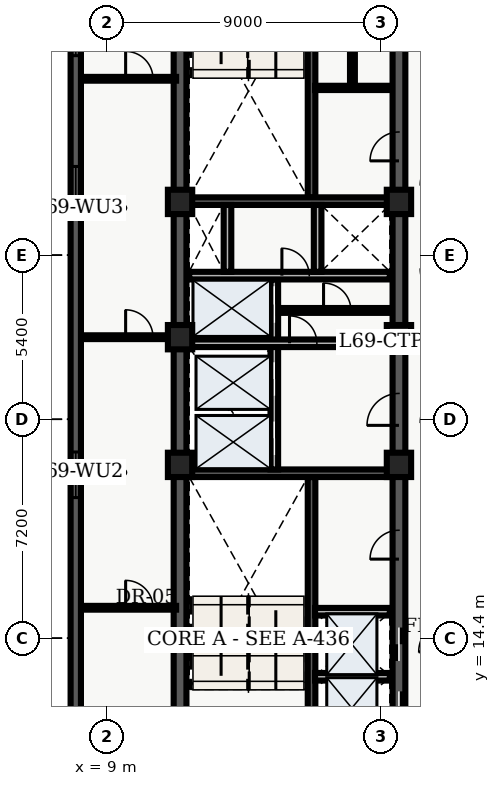
"""IFC4 building model, lengths in metres.
Left out: names, types, materials, properties, quantities, classifications, styles, units other than length and angle.
Written with IfcOpenShell. Run it as: python <this file> out.ifc"""

import sys

from ifc_helpers import new_model, entity, si_unit, converted_unit, direction, frame, origin_with_axes, origin_2d_with_axis, place, context, subcontext, project, spatial, polyline, rectangle, outline, extrude, element, fill, save


model = new_model("IFC4")
c1 = context("Model", 3, precision=1e-05, world=origin_with_axes(), true_north=direction((0.0, 1.0)))
c2 = subcontext(c1, "Body", "Model", "MODEL_VIEW")
j1 = project(units=[si_unit("LENGTHUNIT", "METRE"), converted_unit("PLANEANGLEUNIT", "DEGREE", entity("IfcPlaneAngleMeasure", 0.017), si_unit("PLANEANGLEUNIT", "RADIAN"), dimensions=[0, 0, 0, 0, 0, 0, 0])], contexts=[c1])
p1 = place(None, origin_with_axes())
s1 = spatial("IfcSite", under=j1, at=p1, CompositionType="ELEMENT")
p2 = place(p1, origin_with_axes())
s2 = spatial("IfcBuilding", under=s1, at=p2, CompositionType="ELEMENT")
p3 = place(p2, frame((0.0, 0.0, 280.2), z_axis=(0.0, 0.0, 1.0), x_axis=(1.0, 0.0, 0.0)))
s3 = spatial("IfcBuildingStorey", under=s2, at=p3, CompositionType="ELEMENT", Elevation=280.2)
p4 = place(p3, frame((11.4, 10.8, 0.0), z_axis=(0.0, 0.0, 1.0), x_axis=(0.0, 1.0, 0.0)))
e1 = element("IfcWall", 1, at=p4, inside=s3, PredefinedType="SHEAR", context=c2, shape_type="SweptSolid", body=[
    extrude(outline(polyline([(0.0, -0.21), (27.0, -0.21), (27.0, 0.21), (0.0, 0.21), (0.0, -0.21)])), origin_with_axes(), (0.0, 0.0, 1.0), 3.66),
])
p5 = place(p3, frame((18.6, 10.8, 0.0), z_axis=(0.0, 0.0, 1.0), x_axis=(0.0, 1.0, 0.0)))
e2 = element("IfcWall", 2, at=p5, inside=s3, PredefinedType="SHEAR", context=c2, shape_type="SweptSolid", body=[
    extrude(outline(polyline([(0.0, -0.21), (13.5, -0.21), (13.5, 0.21), (0.0, 0.21), (0.0, -0.21)])), origin_with_axes(), (0.0, 0.0, 1.0), 3.66),
])
p6 = place(p5, frame((1.3, 0.0, 0.0), z_axis=(0.0, 0.0, 1.0), x_axis=(1.0, 0.0, 0.0)))
e3 = element("IfcOpeningElement", 3, at=p6, cuts=e2, PredefinedType="OPENING", context=c2, shape_type="SweptSolid", body=[
    extrude(rectangle(XDim=1.1, YDim=0.44, at=origin_2d_with_axis()), origin_with_axes(), (0.0, 0.0, 1.0), 2.15),
])
p7 = place(p5, frame((3.4, 0.0, 0.0), z_axis=(0.0, 0.0, 1.0), x_axis=(1.0, 0.0, 0.0)))
e4 = element("IfcOpeningElement", 4, at=p7, cuts=e2, PredefinedType="OPENING", context=c2, shape_type="SweptSolid", body=[
    extrude(rectangle(XDim=1.1, YDim=0.44, at=origin_2d_with_axis()), origin_with_axes(), (0.0, 0.0, 1.0), 2.15),
])
p8 = place(p5, frame((11.125, 0.0, 0.0), z_axis=(0.0, 0.0, 1.0), x_axis=(1.0, 0.0, 0.0)))
e5 = element("IfcOpeningElement", 5, at=p8, cuts=e2, PredefinedType="OPENING", context=c2, shape_type="SweptSolid", body=[
    extrude(rectangle(XDim=1.05, YDim=0.44, at=origin_2d_with_axis()), origin_with_axes(), (0.0, 0.0, 1.0), 2.15),
])
p9 = place(p5, frame((6.675, 0.0, 0.0), z_axis=(0.0, 0.0, 1.0), x_axis=(1.0, 0.0, 0.0)))
e6 = element("IfcOpeningElement", 6, at=p9, cuts=e2, PredefinedType="OPENING", context=c2, shape_type="SweptSolid", body=[
    extrude(rectangle(XDim=0.95, YDim=0.44, at=origin_2d_with_axis()), origin_with_axes(), (0.0, 0.0, 1.0), 2.15),
])
p10 = place(p3, frame((18.6, 24.3, 0.0), z_axis=(0.0, 0.0, 1.0), x_axis=(0.0, 1.0, 0.0)))
e7 = element("IfcWall", 7, at=p10, inside=s3, PredefinedType="SHEAR", context=c2, shape_type="SweptSolid", body=[
    extrude(outline(polyline([(0.0, -0.21), (13.5, -0.21), (13.5, 0.21), (0.0, 0.21), (0.0, -0.21)])), origin_with_axes(), (0.0, 0.0, 1.0), 3.66),
])
p11 = place(p10, frame((6.275, 0.0, 0.0), z_axis=(0.0, 0.0, 1.0), x_axis=(1.0, 0.0, 0.0)))
e8 = element("IfcOpeningElement", 8, at=p11, cuts=e7, PredefinedType="OPENING", context=c2, shape_type="SweptSolid", body=[
    extrude(rectangle(XDim=0.95, YDim=0.44, at=origin_2d_with_axis()), origin_with_axes(), (0.0, 0.0, 1.0), 2.15),
])
p12 = place(p10, frame((10.875, 0.0, 0.0), z_axis=(0.0, 0.0, 1.0), x_axis=(1.0, 0.0, 0.0)))
e9 = element("IfcOpeningElement", 9, at=p12, cuts=e7, PredefinedType="OPENING", context=c2, shape_type="SweptSolid", body=[
    extrude(rectangle(XDim=0.95, YDim=0.44, at=origin_2d_with_axis()), origin_with_axes(), (0.0, 0.0, 1.0), 2.15),
])
p13 = place(p3, frame((15.725, 11.01, 0.0), z_axis=(0.0, 0.0, 1.0), x_axis=(0.0, 1.0, 0.0)))
e10 = element("IfcWall", 10, at=p13, inside=s3, PredefinedType="SHEAR", context=c2, shape_type="SweptSolid", body=[
    extrude(outline(polyline([(0.0, -0.125), (8.69, -0.125), (8.69, 0.125), (0.0, 0.125), (0.0, -0.125)])), origin_with_axes(), (0.0, 0.0, 1.0), 3.66),
])
p14 = place(p3, frame((11.61, 19.825, 0.0), z_axis=(0.0, 0.0, 1.0), x_axis=(1.0, 0.0, 0.0)))
e11 = element("IfcWall", 11, at=p14, inside=s3, PredefinedType="SHEAR", context=c2, shape_type="SweptSolid", body=[
    extrude(outline(polyline([(0.0, -0.125), (6.78, -0.125), (6.78, 0.125), (0.0, 0.125), (0.0, -0.125)])), origin_with_axes(), (0.0, 0.0, 1.0), 3.66),
])
p15 = place(p3, frame((15.725, 28.9, 0.0), z_axis=(0.0, 0.0, 1.0), x_axis=(0.0, 1.0, 0.0)))
e12 = element("IfcWall", 12, at=p15, inside=s3, PredefinedType="SHEAR", context=c2, shape_type="SweptSolid", body=[
    extrude(outline(polyline([(0.0, -0.125), (8.69, -0.125), (8.69, 0.125), (0.0, 0.125), (0.0, -0.125)])), origin_with_axes(), (0.0, 0.0, 1.0), 3.66),
])
p16 = place(p3, frame((11.61, 28.775, 0.0), z_axis=(0.0, 0.0, 1.0), x_axis=(1.0, 0.0, 0.0)))
e13 = element("IfcWall", 13, at=p16, inside=s3, PredefinedType="SHEAR", context=c2, shape_type="SweptSolid", body=[
    extrude(outline(polyline([(0.0, -0.125), (6.78, -0.125), (6.78, 0.125), (0.0, 0.125), (0.0, -0.125)])), origin_with_axes(), (0.0, 0.0, 1.0), 3.66),
])
p17 = place(p3, frame((14.5, 19.95, 0.0), z_axis=(0.0, 0.0, 1.0), x_axis=(0.0, 1.0, 0.0)))
e14 = element("IfcWall", 14, at=p17, inside=s3, PredefinedType="SOLIDWALL", context=c2, shape_type="SweptSolid", body=[
    extrude(outline(polyline([(0.0, -0.125), (6.25, -0.125), (6.25, 0.125), (0.0, 0.125), (0.0, -0.125)])), origin_with_axes(), (0.0, 0.0, 1.0), 2.7),
])
p18 = place(p17, frame((1.025, 0.0, 0.0), z_axis=(0.0, 0.0, 1.0), x_axis=(1.0, 0.0, 0.0)))
e15 = element("IfcOpeningElement", 15, at=p18, cuts=e14, PredefinedType="OPENING", context=c2, shape_type="SweptSolid", body=[
    extrude(rectangle(XDim=1.1, YDim=0.27, at=origin_2d_with_axis()), origin_with_axes(), (0.0, 0.0, 1.0), 2.15),
])
p19 = place(p17, frame((2.975, 0.0, 0.0), z_axis=(0.0, 0.0, 1.0), x_axis=(1.0, 0.0, 0.0)))
e16 = element("IfcOpeningElement", 16, at=p19, cuts=e14, PredefinedType="OPENING", context=c2, shape_type="SweptSolid", body=[
    extrude(rectangle(XDim=1.1, YDim=0.27, at=origin_2d_with_axis()), origin_with_axes(), (0.0, 0.0, 1.0), 2.15),
])
p20 = place(p17, frame((5.425, 0.0, 0.0), z_axis=(0.0, 0.0, 1.0), x_axis=(1.0, 0.0, 0.0)))
e17 = element("IfcOpeningElement", 17, at=p20, cuts=e14, PredefinedType="OPENING", context=c2, shape_type="SweptSolid", body=[
    extrude(rectangle(XDim=1.2, YDim=0.27, at=origin_2d_with_axis()), origin_with_axes(), (0.0, 0.0, 1.0), 2.15),
])
p21 = place(p3, frame((11.7, 24.1, 0.0), z_axis=(0.0, 0.0, 1.0), x_axis=(1.0, 0.0, 0.0)))
e18 = element("IfcWall", 18, at=p21, inside=s3, PredefinedType="SOLIDWALL", context=c2, shape_type="SweptSolid", body=[
    extrude(outline(polyline([(0.0, -0.125), (6.6, -0.125), (6.6, 0.125), (0.0, 0.125), (0.0, -0.125)])), origin_with_axes(), (0.0, 0.0, 1.0), 2.7),
])
p22 = place(p21, frame((3.75, 0.0, 0.0), z_axis=(0.0, 0.0, 1.0), x_axis=(1.0, 0.0, 0.0)))
e19 = element("IfcOpeningElement", 19, at=p22, cuts=e18, PredefinedType="OPENING", context=c2, shape_type="SweptSolid", body=[
    extrude(rectangle(XDim=0.9, YDim=0.27, at=origin_2d_with_axis()), origin_with_axes(), (0.0, 0.0, 1.0), 2.15),
])
p23 = place(p3, frame((11.7, 26.325, 0.0), z_axis=(0.0, 0.0, 1.0), x_axis=(1.0, 0.0, 0.0)))
e20 = element("IfcWall", 20, at=p23, inside=s3, PredefinedType="SOLIDWALL", context=c2, shape_type="SweptSolid", body=[
    extrude(outline(polyline([(0.0, -0.125), (6.6, -0.125), (6.6, 0.125), (0.0, 0.125), (0.0, -0.125)])), origin_with_axes(), (0.0, 0.0, 1.0), 2.7),
])
p24 = place(p23, frame((3.5, 0.0, 0.0), z_axis=(0.0, 0.0, 1.0), x_axis=(1.0, 0.0, 0.0)))
e21 = element("IfcOpeningElement", 21, at=p24, cuts=e20, PredefinedType="OPENING", context=c2, shape_type="SweptSolid", body=[
    extrude(rectangle(XDim=0.9, YDim=0.27, at=origin_2d_with_axis()), origin_with_axes(), (0.0, 0.0, 1.0), 2.15),
])
for number, where, z_axis, x_axis in (
    (22, (12.96, 26.45, 0.0), (0.0, 0.0, 1.0), (0.0, 1.0, 0.0)),
    (23, (15.925, 26.45, 0.0), (0.0, 0.0, 1.0), (0.0, 1.0, 0.0)),
):
    element("IfcWall", number, at=place(p3, frame(where, z_axis=z_axis, x_axis=x_axis)), inside=s3, PredefinedType="SOLIDWALL", context=c2, shape_type="SweptSolid", body=[
        extrude(outline(polyline([(0.0, -0.125), (2.2, -0.125), (2.2, 0.125), (0.0, 0.125), (0.0, -0.125)])), origin_with_axes(), (0.0, 0.0, 1.0), 2.7),
    ])
for number, where, z_axis, x_axis in (
    (24, (11.4, 20.1, 0.0), (0.0, 0.0, 1.0), (1.0, 0.0, 0.0)),
    (25, (11.4, 24.3, 0.0), (0.0, 0.0, 1.0), (1.0, 0.0, 0.0)),
    (26, (11.4, 28.75, 0.0), (0.0, 0.0, 1.0), (1.0, 0.0, 0.0)),
    (27, (18.6, 20.1, 0.0), (0.0, 0.0, 1.0), (1.0, 0.0, 0.0)),
    (28, (18.6, 24.3, 0.0), (0.0, 0.0, 1.0), (1.0, 0.0, 0.0)),
    (29, (18.6, 28.75, 0.0), (0.0, 0.0, 1.0), (1.0, 0.0, 0.0)),
):
    element("IfcColumn", number, at=place(p3, frame(where, z_axis=z_axis, x_axis=x_axis)), inside=s3, PredefinedType="COLUMN", context=c2, shape_type="SweptSolid", body=[
        extrude(rectangle(XDim=0.8, YDim=0.8, at=origin_2d_with_axis()), origin_with_axes(), (0.0, 0.0, 1.0), 3.9),
    ])
p25 = place(p3, frame((14.62, 25.18, 0.0), z_axis=(0.0, 0.0, 1.0), x_axis=(1.0, 0.0, 0.0)))
e30 = element("IfcWall", 30, at=p25, inside=s3, PredefinedType="PARTITIONING", context=c2, shape_type="SweptSolid", body=[
    extrude(outline(polyline([(0.0, -0.08), (3.68, -0.08), (3.68, 0.08), (0.0, 0.08), (0.0, -0.08)])), origin_with_axes(), (0.0, 0.0, 1.0), 2.7),
])
p26 = place(p25, frame((1.95, 0.0, 0.0), z_axis=(0.0, 0.0, 1.0), x_axis=(1.0, 0.0, 0.0)))
e31 = element("IfcOpeningElement", 31, at=p26, cuts=e30, PredefinedType="OPENING", context=c2, shape_type="SweptSolid", body=[
    extrude(rectangle(XDim=0.9, YDim=0.18, at=origin_2d_with_axis()), origin_with_axes(), (0.0, 0.0, 1.0), 2.15),
])
for number, where, z_axis, x_axis in (
    (32, (15.84, 13.13, 0.0), (0.0, 0.0, 1.0), (1.0, 0.0, 0.0)),
    (33, (15.84, 15.27, 0.0), (0.0, 0.0, 1.0), (1.0, 0.0, 0.0)),
):
    element("IfcWall", number, at=place(p3, frame(where, z_axis=z_axis, x_axis=x_axis)), inside=s3, PredefinedType="SOLIDWALL", context=c2, shape_type="SweptSolid", body=[
        extrude(outline(polyline([(0.0, -0.125), (2.46, -0.125), (2.46, 0.125), (0.0, 0.125), (0.0, -0.125)])), origin_with_axes(), (0.0, 0.0, 1.0), 2.7),
    ])
p27 = place(p3, frame((15.84, 32.5, 0.0), z_axis=(0.0, 0.0, 1.0), x_axis=(1.0, 0.0, 0.0)))
e34 = element("IfcWall", 34, at=p27, inside=s3, PredefinedType="PARTITIONING", context=c2, shape_type="SweptSolid", body=[
    extrude(outline(polyline([(0.0, -0.07), (2.46, -0.07), (2.46, 0.07), (0.0, 0.07), (0.0, -0.07)])), origin_with_axes(), (0.0, 0.0, 1.0), 2.7),
])
p28 = place(p3, frame((17.07, 32.58, 0.0), z_axis=(0.0, 0.0, 1.0), x_axis=(0.0, 1.0, 0.0)))
e35 = element("IfcWall", 35, at=p28, inside=s3, PredefinedType="PARTITIONING", context=c2, shape_type="SweptSolid", body=[
    extrude(outline(polyline([(0.0, -0.08), (4.92, -0.08), (4.92, 0.08), (0.0, 0.08), (0.0, -0.08)])), origin_with_axes(), (0.0, 0.0, 1.0), 2.7),
])
p29 = place(p28, frame((2.45, 0.0, 0.0), z_axis=(0.0, 0.0, 1.0), x_axis=(1.0, 0.0, 0.0)))
e36 = element("IfcOpeningElement", 36, at=p29, cuts=e35, PredefinedType="OPENING", context=c2, shape_type="SweptSolid", body=[
    extrude(rectangle(XDim=0.9, YDim=0.18, at=origin_2d_with_axis()), origin_with_axes(), (0.0, 0.0, 1.0), 2.15),
])
p30 = place(p3, frame((8.135, 15.4, 0.0), z_axis=(0.0, 0.0, 1.0), x_axis=(1.0, 0.0, 0.0)))
e37 = element("IfcWall", 37, at=p30, inside=s3, PredefinedType="PARTITIONING", context=c2, shape_type="SweptSolid", body=[
    extrude(outline(polyline([(0.0, -0.062), (3.135, -0.062), (3.135, 0.062), (0.0, 0.062), (0.0, -0.062)])), origin_with_axes(), (0.0, 0.0, 1.0), 2.7),
])
p31 = place(p30, frame((1.925, 0.0, 0.0), z_axis=(0.0, 0.0, 1.0), x_axis=(1.0, 0.0, 0.0)))
e38 = element("IfcOpeningElement", 38, at=p31, cuts=e37, PredefinedType="OPENING", context=c2, shape_type="SweptSolid", body=[
    extrude(rectangle(XDim=0.9, YDim=0.145, at=origin_2d_with_axis()), origin_with_axes(), (0.0, 0.0, 1.0), 2.15),
])
p32 = place(p3, frame((8.135, 24.3, 0.0), z_axis=(0.0, 0.0, 1.0), x_axis=(1.0, 0.0, 0.0)))
e39 = element("IfcWall", 39, at=p32, inside=s3, PredefinedType="PARTITIONING", context=c2, shape_type="SweptSolid", body=[
    extrude(outline(polyline([(0.0, -0.062), (3.135, -0.062), (3.135, 0.062), (0.0, 0.062), (0.0, -0.062)])), origin_with_axes(), (0.0, 0.0, 1.0), 2.7),
])
p33 = place(p32, frame((1.925, 0.0, 0.0), z_axis=(0.0, 0.0, 1.0), x_axis=(1.0, 0.0, 0.0)))
e40 = element("IfcOpeningElement", 40, at=p33, cuts=e39, PredefinedType="OPENING", context=c2, shape_type="SweptSolid", body=[
    extrude(rectangle(XDim=0.9, YDim=0.145, at=origin_2d_with_axis()), origin_with_axes(), (0.0, 0.0, 1.0), 2.15),
])
p34 = place(p3, frame((8.135, 32.8, 0.0), z_axis=(0.0, 0.0, 1.0), x_axis=(1.0, 0.0, 0.0)))
e41 = element("IfcWall", 41, at=p34, inside=s3, PredefinedType="PARTITIONING", context=c2, shape_type="SweptSolid", body=[
    extrude(outline(polyline([(0.0, -0.062), (3.135, -0.062), (3.135, 0.062), (0.0, 0.062), (0.0, -0.062)])), origin_with_axes(), (0.0, 0.0, 1.0), 2.7),
])
p35 = place(p34, frame((1.925, 0.0, 0.0), z_axis=(0.0, 0.0, 1.0), x_axis=(1.0, 0.0, 0.0)))
e42 = element("IfcOpeningElement", 42, at=p35, cuts=e41, PredefinedType="OPENING", context=c2, shape_type="SweptSolid", body=[
    extrude(rectangle(XDim=0.9, YDim=0.145, at=origin_2d_with_axis()), origin_with_axes(), (0.0, 0.0, 1.0), 2.15),
])
p36 = place(p3, frame((7.97, 2.74, 0.0), z_axis=(0.0, 0.0, 1.0), x_axis=(0.0, 1.0, 0.0)))
e43 = element("IfcWall", 43, at=p36, inside=s3, PredefinedType="SOLIDWALL", context=c2, shape_type="SweptSolid", body=[
    extrude(outline(polyline([(0.0, -0.17), (43.46, -0.17), (43.46, 0.17), (0.0, 0.17), (0.0, -0.17)])), origin_with_axes(), (0.0, 0.0, 1.0), 3.66),
])
p37 = place(p36, frame((2.948, 0.0, 0.45), z_axis=(0.0, 0.0, 1.0), x_axis=(1.0, 0.0, 0.0)))
e44 = element("IfcOpeningElement", 44, at=p37, cuts=e43, PredefinedType="OPENING", context=c2, shape_type="SweptSolid", body=[
    extrude(rectangle(XDim=1.5, YDim=0.36, at=origin_2d_with_axis()), origin_with_axes(), (0.0, 0.0, 1.0), 2.1),
])
p38 = place(p36, frame((7.643, 0.0, 0.45), z_axis=(0.0, 0.0, 1.0), x_axis=(1.0, 0.0, 0.0)))
e45 = element("IfcOpeningElement", 45, at=p38, cuts=e43, PredefinedType="OPENING", context=c2, shape_type="SweptSolid", body=[
    extrude(rectangle(XDim=1.5, YDim=0.36, at=origin_2d_with_axis()), origin_with_axes(), (0.0, 0.0, 1.0), 2.1),
])
p39 = place(p36, frame((17.034, 0.0, 0.45), z_axis=(0.0, 0.0, 1.0), x_axis=(1.0, 0.0, 0.0)))
e46 = element("IfcOpeningElement", 46, at=p39, cuts=e43, PredefinedType="OPENING", context=c2, shape_type="SweptSolid", body=[
    extrude(rectangle(XDim=1.5, YDim=0.36, at=origin_2d_with_axis()), origin_with_axes(), (0.0, 0.0, 1.0), 2.1),
])
p40 = place(p36, frame((26.426, 0.0, 0.45), z_axis=(0.0, 0.0, 1.0), x_axis=(1.0, 0.0, 0.0)))
e47 = element("IfcOpeningElement", 47, at=p40, cuts=e43, PredefinedType="OPENING", context=c2, shape_type="SweptSolid", body=[
    extrude(rectangle(XDim=1.5, YDim=0.36, at=origin_2d_with_axis()), origin_with_axes(), (0.0, 0.0, 1.0), 2.1),
])
p41 = place(p36, frame((31.571, 0.0, 0.45), z_axis=(0.0, 0.0, 1.0), x_axis=(1.0, 0.0, 0.0)))
e48 = element("IfcOpeningElement", 48, at=p41, cuts=e43, PredefinedType="OPENING", context=c2, shape_type="SweptSolid", body=[
    extrude(rectangle(XDim=1.5, YDim=0.36, at=origin_2d_with_axis()), origin_with_axes(), (0.0, 0.0, 1.0), 2.1),
])
p42 = place(p36, frame((35.817, 0.0, 0.45), z_axis=(0.0, 0.0, 1.0), x_axis=(1.0, 0.0, 0.0)))
e49 = element("IfcOpeningElement", 49, at=p42, cuts=e43, PredefinedType="OPENING", context=c2, shape_type="SweptSolid", body=[
    extrude(rectangle(XDim=1.5, YDim=0.36, at=origin_2d_with_axis()), origin_with_axes(), (0.0, 0.0, 1.0), 2.1),
])
p43 = place(p36, frame((40.512, 0.0, 0.45), z_axis=(0.0, 0.0, 1.0), x_axis=(1.0, 0.0, 0.0)))
e50 = element("IfcOpeningElement", 50, at=p43, cuts=e43, PredefinedType="OPENING", context=c2, shape_type="SweptSolid", body=[
    extrude(rectangle(XDim=1.5, YDim=0.36, at=origin_2d_with_axis()), origin_with_axes(), (0.0, 0.0, 1.0), 2.1),
])
p44 = place(p5, frame((1.3, 0.0, 0.0), z_axis=(0.0, 0.0, 1.0), x_axis=(1.0, 0.0, 0.0)))
e51 = element("IfcDoor", 51, at=p44, inside=s3, OperationType="SLIDING_TO_LEFT", PredefinedType="DOOR", context=c2, shape_type="SweptSolid", body=[
    extrude(rectangle(XDim=1.1, YDim=0.09, at=origin_2d_with_axis()), origin_with_axes(), (0.0, 0.0, 1.0), 2.15),
])
fill(e3, e51)
p45 = place(p5, frame((3.4, 0.0, 0.0), z_axis=(0.0, 0.0, 1.0), x_axis=(1.0, 0.0, 0.0)))
e52 = element("IfcDoor", 52, at=p45, inside=s3, OperationType="SLIDING_TO_RIGHT", PredefinedType="DOOR", context=c2, shape_type="SweptSolid", body=[
    extrude(rectangle(XDim=1.1, YDim=0.09, at=origin_2d_with_axis()), origin_with_axes(), (0.0, 0.0, 1.0), 2.15),
])
fill(e4, e52)
p46 = place(p17, frame((1.025, 0.0, 0.0), z_axis=(0.0, 0.0, 1.0), x_axis=(1.0, 0.0, 0.0)))
e53 = element("IfcDoor", 53, at=p46, inside=s3, OperationType="SLIDING_TO_LEFT", PredefinedType="DOOR", context=c2, shape_type="SweptSolid", body=[
    extrude(rectangle(XDim=1.1, YDim=0.09, at=origin_2d_with_axis()), origin_with_axes(), (0.0, 0.0, 1.0), 2.15),
])
fill(e15, e53)
p47 = place(p17, frame((2.975, 0.0, 0.0), z_axis=(0.0, 0.0, 1.0), x_axis=(1.0, 0.0, 0.0)))
e54 = element("IfcDoor", 54, at=p47, inside=s3, OperationType="SLIDING_TO_RIGHT", PredefinedType="DOOR", context=c2, shape_type="SweptSolid", body=[
    extrude(rectangle(XDim=1.1, YDim=0.09, at=origin_2d_with_axis()), origin_with_axes(), (0.0, 0.0, 1.0), 2.15),
])
fill(e16, e54)
p48 = place(p17, frame((5.425, 0.0, 0.0), z_axis=(0.0, 0.0, 1.0), x_axis=(1.0, 0.0, 0.0)))
e55 = element("IfcDoor", 55, at=p48, inside=s3, OperationType="DOUBLE_DOOR_SLIDING", PredefinedType="DOOR", context=c2, shape_type="SweptSolid", body=[
    extrude(rectangle(XDim=1.2, YDim=0.09, at=origin_2d_with_axis()), origin_with_axes(), (0.0, 0.0, 1.0), 2.15),
])
fill(e17, e55)
p49 = place(p5, frame((11.125, 0.0, 0.0), z_axis=(0.0, 0.0, 1.0), x_axis=(1.0, 0.0, 0.0)))
e56 = element("IfcDoor", 56, at=p49, inside=s3, OperationType="SINGLE_SWING_LEFT", PredefinedType="DOOR", context=c2, shape_type="SweptSolid", body=[
    extrude(rectangle(XDim=1.05, YDim=0.09, at=origin_2d_with_axis()), origin_with_axes(), (0.0, 0.0, 1.0), 2.15),
])
fill(e5, e56)
p50 = place(p23, frame((3.5, 0.0, 0.0), z_axis=(0.0, 0.0, 1.0), x_axis=(1.0, 0.0, 0.0)))
e57 = element("IfcDoor", 57, at=p50, inside=s3, OperationType="SINGLE_SWING_LEFT", PredefinedType="DOOR", context=c2, shape_type="SweptSolid", body=[
    extrude(rectangle(XDim=0.9, YDim=0.09, at=origin_2d_with_axis()), origin_with_axes(), (0.0, 0.0, 1.0), 2.15),
])
fill(e21, e57)
p51 = place(p21, frame((3.75, 0.0, 0.0), z_axis=(0.0, 0.0, 1.0), x_axis=(1.0, 0.0, 0.0)))
e58 = element("IfcDoor", 58, at=p51, inside=s3, OperationType="SINGLE_SWING_LEFT", PredefinedType="DOOR", context=c2, shape_type="SweptSolid", body=[
    extrude(rectangle(XDim=0.9, YDim=0.09, at=origin_2d_with_axis()), origin_with_axes(), (0.0, 0.0, 1.0), 2.15),
])
fill(e19, e58)
p52 = place(p25, frame((1.95, 0.0, 0.0), z_axis=(0.0, 0.0, 1.0), x_axis=(1.0, 0.0, 0.0)))
e59 = element("IfcDoor", 59, at=p52, inside=s3, OperationType="SINGLE_SWING_LEFT", PredefinedType="DOOR", context=c2, shape_type="SweptSolid", body=[
    extrude(rectangle(XDim=0.9, YDim=0.09, at=origin_2d_with_axis()), origin_with_axes(), (0.0, 0.0, 1.0), 2.15),
])
fill(e31, e59)
p53 = place(p5, frame((6.675, 0.0, 0.0), z_axis=(0.0, 0.0, 1.0), x_axis=(1.0, 0.0, 0.0)))
e60 = element("IfcDoor", 60, at=p53, inside=s3, OperationType="SINGLE_SWING_LEFT", PredefinedType="DOOR", context=c2, shape_type="SweptSolid", body=[
    extrude(rectangle(XDim=0.95, YDim=0.09, at=origin_2d_with_axis()), origin_with_axes(), (0.0, 0.0, 1.0), 2.15),
])
fill(e6, e60)
p54 = place(p10, frame((6.275, 0.0, 0.0), z_axis=(0.0, 0.0, 1.0), x_axis=(1.0, 0.0, 0.0)))
e61 = element("IfcDoor", 61, at=p54, inside=s3, OperationType="SINGLE_SWING_LEFT", PredefinedType="DOOR", context=c2, shape_type="SweptSolid", body=[
    extrude(rectangle(XDim=0.95, YDim=0.09, at=origin_2d_with_axis()), origin_with_axes(), (0.0, 0.0, 1.0), 2.15),
])
fill(e8, e61)
p55 = place(p30, frame((1.925, 0.0, 0.0), z_axis=(0.0, 0.0, 1.0), x_axis=(1.0, 0.0, 0.0)))
e62 = element("IfcDoor", 62, at=p55, inside=s3, OperationType="SINGLE_SWING_LEFT", PredefinedType="DOOR", context=c2, shape_type="SweptSolid", body=[
    extrude(rectangle(XDim=0.9, YDim=0.075, at=origin_2d_with_axis()), origin_with_axes(), (0.0, 0.0, 1.0), 2.15),
])
fill(e38, e62)
p56 = place(p32, frame((1.925, 0.0, 0.0), z_axis=(0.0, 0.0, 1.0), x_axis=(1.0, 0.0, 0.0)))
e63 = element("IfcDoor", 63, at=p56, inside=s3, OperationType="SINGLE_SWING_LEFT", PredefinedType="DOOR", context=c2, shape_type="SweptSolid", body=[
    extrude(rectangle(XDim=0.9, YDim=0.075, at=origin_2d_with_axis()), origin_with_axes(), (0.0, 0.0, 1.0), 2.15),
])
fill(e40, e63)
p57 = place(p34, frame((1.925, 0.0, 0.0), z_axis=(0.0, 0.0, 1.0), x_axis=(1.0, 0.0, 0.0)))
e64 = element("IfcDoor", 64, at=p57, inside=s3, OperationType="SINGLE_SWING_LEFT", PredefinedType="DOOR", context=c2, shape_type="SweptSolid", body=[
    extrude(rectangle(XDim=0.9, YDim=0.075, at=origin_2d_with_axis()), origin_with_axes(), (0.0, 0.0, 1.0), 2.15),
])
fill(e42, e64)
p58 = place(p36, frame((17.034, 0.0, 0.45), z_axis=(0.0, 0.0, 1.0), x_axis=(1.0, 0.0, 0.0)))
e65 = element("IfcWindow", 65, at=p58, inside=s3, PredefinedType="WINDOW", context=c2, shape_type="SweptSolid", body=[
    extrude(rectangle(XDim=1.5, YDim=0.09, at=origin_2d_with_axis()), origin_with_axes(), (0.0, 0.0, 1.0), 2.1),
])
fill(e46, e65)
p59 = place(p36, frame((26.426, 0.0, 0.45), z_axis=(0.0, 0.0, 1.0), x_axis=(1.0, 0.0, 0.0)))
e66 = element("IfcWindow", 66, at=p59, inside=s3, PredefinedType="WINDOW", context=c2, shape_type="SweptSolid", body=[
    extrude(rectangle(XDim=1.5, YDim=0.09, at=origin_2d_with_axis()), origin_with_axes(), (0.0, 0.0, 1.0), 2.1),
])
fill(e47, e66)
p60 = place(p36, frame((31.571, 0.0, 0.45), z_axis=(0.0, 0.0, 1.0), x_axis=(1.0, 0.0, 0.0)))
e67 = element("IfcWindow", 67, at=p60, inside=s3, PredefinedType="WINDOW", context=c2, shape_type="SweptSolid", body=[
    extrude(rectangle(XDim=1.5, YDim=0.09, at=origin_2d_with_axis()), origin_with_axes(), (0.0, 0.0, 1.0), 2.1),
])
fill(e48, e67)
save(model, sys.argv[1])
